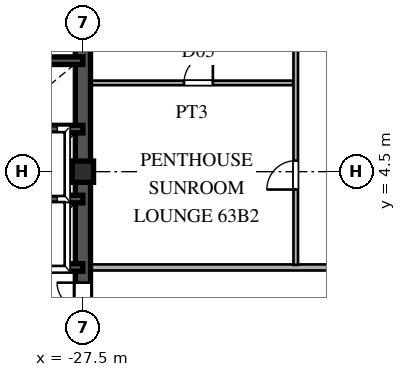
"""IFC4 building model, lengths in metres.
Left out: names, types, materials, properties, quantities, classifications, styles, units other than length and angle.
Written with IfcOpenShell. Run it as: python <this file> out.ifc"""

import sys

from ifc_helpers import new_model, si_unit, direction, frame, frame_2d, origin, origin_2d, place, context, subcontext, project, spatial, rectangle, hollow_rectangle, extrude, source, transform, mapped, element, fill, save


model = new_model("IFC4")
c1 = context("Model", 3, precision=1e-05, world=origin(), true_north=direction((0.0, 1.0)))
c2 = subcontext(c1, "Body", "Model", "MODEL_VIEW")
j1 = project(units=[si_unit("LENGTHUNIT", "METRE"), si_unit("PLANEANGLEUNIT", "RADIAN")], contexts=[c1])
p1 = place(None, origin())
s1 = spatial("IfcSite", under=j1, at=p1, CompositionType="ELEMENT")
p2 = place(p1, origin())
s2 = spatial("IfcBuilding", under=s1, at=p2, CompositionType="ELEMENT")
p3 = place(p2, frame((0.0, 0.0, 239.4)))
s3 = spatial("IfcBuildingStorey", under=s2, at=p3, CompositionType="ELEMENT", Elevation=239.4)
m1 = source(origin(), c2, "Body", "SweptSolid", [
    extrude(hollow_rectangle(XDim=0.7, YDim=0.7, WallThickness=0.03, at=origin_2d()), origin(), (0.0, 0.0, 1.0), 3.75),
])
p4 = place(p3, frame((-27.5, 4.5, 0.0), z_axis=(0.0, 0.0, 1.0), x_axis=(1.0, 0.0, 0.0)))
e1 = element("IfcColumn", 1, at=p4, inside=s3, PredefinedType="COLUMN", context=c2, shape_type="MappedRepresentation", body=[
    mapped(m1, transform((0.0, 0.0, 0.0), scale=1.0)),
])
p5 = place(p3, frame((-27.5, 1.3, 0.0), z_axis=(0.0, 0.0, 1.0), x_axis=(0.0, 1.0, 0.0)))
e2 = element("IfcWall", 2, at=p5, inside=s3, PredefinedType="SHEAR", context=c2, shape_type="SweptSolid", body=[
    extrude(rectangle(XDim=12.2, YDim=0.5, at=frame_2d((6.1, 0.0))), origin(), (0.0, 0.0, 1.0), 3.53),
])
p6 = place(p3, frame((-27.5, -1.3, 0.0), z_axis=(0.0, 0.0, 1.0), x_axis=(0.0, 1.0, 0.0)))
e3 = element("IfcWall", 3, at=p6, inside=s3, PredefinedType="SHEAR", context=c2, shape_type="SweptSolid", body=[
    extrude(rectangle(XDim=2.6, YDim=0.5, at=frame_2d((1.3, 0.0))), origin(), (0.0, 0.0, 1.0), 3.53),
])
p7 = place(p6, frame((0.45, 0.0, 0.0)))
e4 = element("IfcOpeningElement", 4, at=p7, cuts=e3, PredefinedType="OPENING", context=c2, shape_type="SweptSolid", body=[
    extrude(rectangle(XDim=1.7, YDim=2.35, at=frame_2d((0.85, 1.175))), frame((0.0, 0.26, 0.0), z_axis=(0.0, -1.0, 0.0), x_axis=(1.0, 0.0, 0.0)), (0.0, 0.0, 1.0), 0.52),
])
for number, where, z_axis, x_axis in (
    (5, (-30.3, 1.35, 0.0), (0.0, 0.0, 1.0), (1.0, 0.0, 0.0)),
    (6, (-30.3, 3.6, 0.0), (0.0, 0.0, 1.0), (1.0, 0.0, 0.0)),
    (7, (-30.3, 5.9, 0.0), (0.0, 0.0, 1.0), (1.0, 0.0, 0.0)),
    (8, (-30.3, 8.15, 0.0), (0.0, 0.0, 1.0), (1.0, 0.0, 0.0)),
):
    element("IfcWall", number, at=place(p3, frame(where, z_axis=z_axis, x_axis=x_axis)), inside=s3, PredefinedType="SHEAR", context=c2, shape_type="SweptSolid", body=[
        extrude(rectangle(XDim=2.8, YDim=0.25, at=frame_2d((1.4, 0.0))), origin(), (0.0, 0.0, 1.0), 3.53),
    ])
p8 = place(p3, frame((-27.245, 1.35, 0.0), z_axis=(0.0, 0.0, 1.0), x_axis=(1.0, 0.0, 0.0)))
e9 = element("IfcWall", 9, at=p8, inside=s3, PredefinedType="PARTITIONING", context=c2, shape_type="SweptSolid", body=[
    extrude(rectangle(XDim=54.49, YDim=0.2, at=frame_2d((27.245, 0.0))), origin(), (0.0, 0.0, 1.0), 3.53),
])
p9 = place(p8, frame((23.47, 0.0, 0.0)))
e10 = element("IfcOpeningElement", 10, at=p9, cuts=e9, PredefinedType="OPENING", context=c2, shape_type="SweptSolid", body=[
    extrude(rectangle(XDim=1.05, YDim=2.25, at=frame_2d((0.525, 1.125))), frame((0.0, 0.11, 0.0), z_axis=(0.0, -1.0, 0.0), x_axis=(1.0, 0.0, 0.0)), (0.0, 0.0, 1.0), 0.22),
])
p10 = place(p3, frame((-27.245, 7.42, 0.0), z_axis=(0.0, 0.0, 1.0), x_axis=(1.0, 0.0, 0.0)))
e11 = element("IfcWall", 11, at=p10, inside=s3, PredefinedType="PARTITIONING", context=c2, shape_type="SweptSolid", body=[
    extrude(rectangle(XDim=6.66, YDim=0.15, at=frame_2d((3.33, 0.0))), origin(), (0.0, 0.0, 1.0), 3.53),
])
p11 = place(p10, frame((3.07, 0.0, 0.0)))
e12 = element("IfcOpeningElement", 12, at=p11, cuts=e11, PredefinedType="OPENING", context=c2, shape_type="SweptSolid", body=[
    extrude(rectangle(XDim=0.95, YDim=2.15, at=frame_2d((0.475, 1.075))), frame((0.0, 0.085, 0.0), z_axis=(0.0, -1.0, 0.0), x_axis=(1.0, 0.0, 0.0)), (0.0, 0.0, 1.0), 0.17),
])
p12 = place(p3, frame((-20.5, 1.435, 0.0), z_axis=(0.0, 0.0, 1.0), x_axis=(0.0, 1.0, 0.0)))
e13 = element("IfcWall", 13, at=p12, inside=s3, PredefinedType="PARTITIONING", context=c2, shape_type="SweptSolid", body=[
    extrude(rectangle(XDim=12.065, YDim=0.15, at=frame_2d((6.032, 0.0))), origin(), (0.0, 0.0, 1.0), 3.53),
])
p13 = place(p12, frame((2.478, 0.0, 0.0)))
e14 = element("IfcOpeningElement", 14, at=p13, cuts=e13, PredefinedType="OPENING", context=c2, shape_type="SweptSolid", body=[
    extrude(rectangle(XDim=0.95, YDim=2.15, at=frame_2d((0.475, 1.075))), frame((0.0, 0.085, 0.0), z_axis=(0.0, -1.0, 0.0), x_axis=(1.0, 0.0, 0.0)), (0.0, 0.0, 1.0), 0.17),
])
m2 = source(origin(), c2, "Body", "SweptSolid", [
    extrude(rectangle(XDim=1.7, YDim=2.35, at=frame_2d((0.85, 1.175))), frame((0.0, 0.025, 0.0), z_axis=(0.0, -1.0, 0.0), x_axis=(1.0, 0.0, 0.0)), (0.0, 0.0, 1.0), 0.05),
])
p14 = place(p7, origin())
e15 = element("IfcDoor", 15, at=p14, inside=s3, OperationType="DOUBLE_SWING_LEFT", PredefinedType="DOOR", context=c2, shape_type="MappedRepresentation", body=[
    mapped(m2, transform((0.0, 0.0, 0.0), scale=1.0)),
])
fill(e4, e15)
m3 = source(origin(), c2, "Body", "SweptSolid", [
    extrude(rectangle(XDim=0.95, YDim=2.15, at=frame_2d((0.475, 1.075))), frame((0.0, 0.025, 0.0), z_axis=(0.0, -1.0, 0.0), x_axis=(1.0, 0.0, 0.0)), (0.0, 0.0, 1.0), 0.05),
])
p15 = place(p11, origin())
e16 = element("IfcDoor", 16, at=p15, inside=s3, OperationType="SINGLE_SWING_RIGHT", PredefinedType="DOOR", context=c2, shape_type="MappedRepresentation", body=[
    mapped(m3, transform((0.0, 0.0, 0.0), scale=1.0)),
])
fill(e12, e16)
p16 = place(p13, origin())
e17 = element("IfcDoor", 17, at=p16, inside=s3, OperationType="SINGLE_SWING_LEFT", PredefinedType="DOOR", context=c2, shape_type="MappedRepresentation", body=[
    mapped(m3, transform((0.0, 0.0, 0.0), scale=1.0)),
])
fill(e14, e17)
save(model, sys.argv[1])
